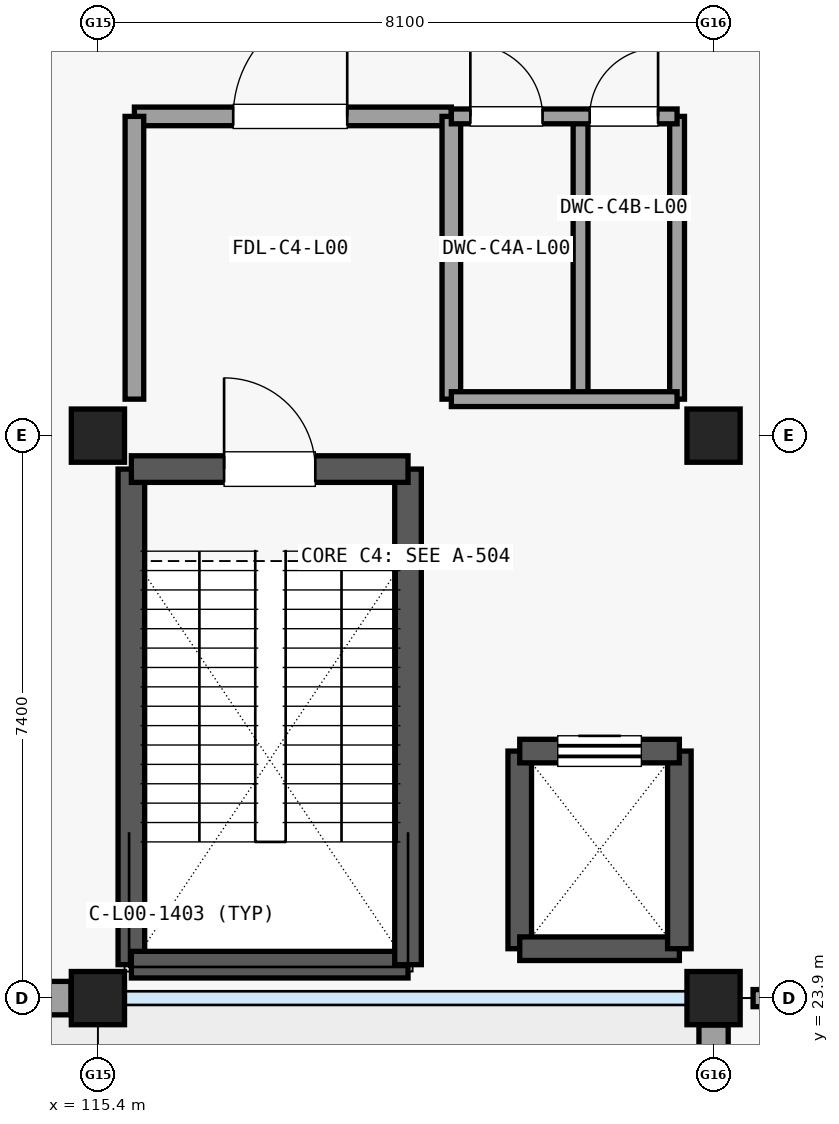
"""IFC4 building model, lengths in metres.
Left out: names, types, materials, properties, quantities, classifications, styles, units other than length and angle.
Written with IfcOpenShell. Run it as: python <this file> out.ifc"""

import sys

from ifc_helpers import new_model, si_unit, direction, frame, frame_2d, origin, origin_2d, place, context, subcontext, project, spatial, rectangle, extrude, element, fill, save


model = new_model("IFC4")
c1 = context("Model", 3, precision=1e-05, world=origin(), true_north=direction((0.0, 1.0)))
c2 = subcontext(c1, "Body", "Model", "MODEL_VIEW")
j1 = project(units=[si_unit("LENGTHUNIT", "METRE"), si_unit("PLANEANGLEUNIT", "RADIAN")], contexts=[c1])
p1 = place(None, origin())
s1 = spatial("IfcSite", under=j1, at=p1, CompositionType="ELEMENT")
p2 = place(p1, origin())
s2 = spatial("IfcBuilding", under=s1, at=p2, CompositionType="ELEMENT")
p3 = place(p2, origin())
s3 = spatial("IfcBuildingStorey", under=s2, at=p3, CompositionType="ELEMENT", Elevation=0.0)
for number, where, z_axis, x_axis in (
    (1, (115.4, 23.9, 0.0), (0.0, 0.0, 1.0), (1.0, 0.0, 0.0)),
    (2, (115.4, 31.3, 0.0), (0.0, 0.0, 1.0), (1.0, 0.0, 0.0)),
    (3, (123.5, 23.9, 0.0), (0.0, 0.0, 1.0), (1.0, 0.0, 0.0)),
    (4, (123.5, 31.3, 0.0), (0.0, 0.0, 1.0), (1.0, 0.0, 0.0)),
):
    element("IfcColumn", number, at=place(p3, frame(where, z_axis=z_axis, x_axis=x_axis)), inside=s3, PredefinedType="COLUMN", context=c2, shape_type="SweptSolid", body=[
        extrude(rectangle(XDim=0.7, YDim=0.7, at=origin_2d()), origin(), (0.0, 0.0, 1.0), 5.135),
    ])
p4 = place(p3, frame((115.046, 23.9, 0.0), z_axis=(0.0, 0.0, 1.0), x_axis=(-1.0, 0.0, 0.0)))
e5 = element("IfcWall", 5, at=p4, inside=s3, PredefinedType="SOLIDWALL", context=c2, shape_type="SweptSolid", body=[
    extrude(rectangle(XDim=7.392, YDim=0.44, at=frame_2d((3.696, 0.0))), origin(), (0.0, 0.0, 1.0), 4.27),
])
p5 = place(p4, frame((2.696, 0.0, 0.0)))
e6 = element("IfcOpeningElement", 6, at=p5, cuts=e5, PredefinedType="OPENING", context=c2, shape_type="SweptSolid", body=[
    extrude(rectangle(XDim=2.0, YDim=2.3, at=frame_2d((1.0, 1.15))), frame((0.0, 0.23, 0.0), z_axis=(0.0, -1.0, 0.0), x_axis=(1.0, 0.0, 0.0)), (0.0, 0.0, 1.0), 0.46),
])
p6 = place(p3, frame((123.5, 16.854, 0.0), z_axis=(0.0, 0.0, 1.0), x_axis=(0.0, 1.0, 0.0)))
e7 = element("IfcWall", 7, at=p6, inside=s3, PredefinedType="SOLIDWALL", context=c2, shape_type="SweptSolid", body=[
    extrude(rectangle(XDim=6.692, YDim=0.385, at=frame_2d((3.346, 0.0))), origin(), (0.0, 0.0, 1.0), 4.27),
])
p7 = place(p6, frame((2.206, 0.0, 0.65)))
e8 = element("IfcOpeningElement", 8, at=p7, cuts=e7, PredefinedType="OPENING", context=c2, shape_type="SweptSolid", body=[
    extrude(rectangle(XDim=0.9, YDim=3.4, at=frame_2d((0.45, 1.7))), frame((0.0, 0.203, 0.0), z_axis=(0.0, -1.0, 0.0), x_axis=(1.0, 0.0, 0.0)), (0.0, 0.0, 1.0), 0.405),
])
p8 = place(p6, frame((3.586, 0.0, 0.65)))
e9 = element("IfcOpeningElement", 9, at=p8, cuts=e7, PredefinedType="OPENING", context=c2, shape_type="SweptSolid", body=[
    extrude(rectangle(XDim=0.9, YDim=3.4, at=frame_2d((0.45, 1.7))), frame((0.0, 0.203, 0.0), z_axis=(0.0, -1.0, 0.0), x_axis=(1.0, 0.0, 0.0)), (0.0, 0.0, 1.0), 0.405),
])
p9 = place(p3, frame((115.84, 24.34, 0.0), z_axis=(0.0, 0.0, 1.0), x_axis=(0.0, 1.0, 0.0)))
e10 = element("IfcWall", 10, at=p9, inside=s3, PredefinedType="SHEAR", context=c2, shape_type="SweptSolid", body=[
    extrude(rectangle(XDim=6.52, YDim=0.35, at=frame_2d((3.26, 0.0))), origin(), (0.0, 0.0, 1.0), 5.13),
])
p10 = place(p3, frame((115.84, 24.34, 0.0), z_axis=(0.0, 0.0, 1.0), x_axis=(1.0, 0.0, 0.0)))
e11 = element("IfcWall", 11, at=p10, inside=s3, PredefinedType="SHEAR", context=c2, shape_type="SweptSolid", body=[
    extrude(rectangle(XDim=3.64, YDim=0.35, at=frame_2d((1.82, 0.0))), origin(), (0.0, 0.0, 1.0), 5.13),
])
p11 = place(p3, frame((119.48, 24.34, 0.0), z_axis=(0.0, 0.0, 1.0), x_axis=(0.0, 1.0, 0.0)))
e12 = element("IfcWall", 12, at=p11, inside=s3, PredefinedType="SHEAR", context=c2, shape_type="SweptSolid", body=[
    extrude(rectangle(XDim=6.52, YDim=0.35, at=frame_2d((3.26, 0.0))), origin(), (0.0, 0.0, 1.0), 5.13),
])
p12 = place(p3, frame((115.84, 30.86, 0.0), z_axis=(0.0, 0.0, 1.0), x_axis=(1.0, 0.0, 0.0)))
e13 = element("IfcWall", 13, at=p12, inside=s3, PredefinedType="SHEAR", context=c2, shape_type="SweptSolid", body=[
    extrude(rectangle(XDim=3.64, YDim=0.35, at=frame_2d((1.82, 0.0))), origin(), (0.0, 0.0, 1.0), 5.13),
])
p13 = place(p12, frame((1.22, 0.0, 0.0)))
e14 = element("IfcOpeningElement", 14, at=p13, cuts=e13, PredefinedType="OPENING", context=c2, shape_type="SweptSolid", body=[
    extrude(rectangle(XDim=1.2, YDim=2.15, at=frame_2d((0.6, 1.075))), frame((0.0, 0.185, 0.0), z_axis=(0.0, -1.0, 0.0), x_axis=(1.0, 0.0, 0.0)), (0.0, 0.0, 1.0), 0.37),
])
p14 = place(p3, frame((120.95, 24.55, 0.0), z_axis=(0.0, 0.0, 1.0), x_axis=(0.0, 1.0, 0.0)))
e15 = element("IfcWall", 15, at=p14, inside=s3, PredefinedType="SHEAR", context=c2, shape_type="SweptSolid", body=[
    extrude(rectangle(XDim=2.6, YDim=0.31, at=frame_2d((1.3, 0.0))), origin(), (0.0, 0.0, 1.0), 5.13),
])
p15 = place(p3, frame((120.95, 24.55, 0.0), z_axis=(0.0, 0.0, 1.0), x_axis=(1.0, 0.0, 0.0)))
e16 = element("IfcWall", 16, at=p15, inside=s3, PredefinedType="SHEAR", context=c2, shape_type="SweptSolid", body=[
    extrude(rectangle(XDim=2.1, YDim=0.31, at=frame_2d((1.05, 0.0))), origin(), (0.0, 0.0, 1.0), 5.13),
])
p16 = place(p3, frame((123.05, 24.55, 0.0), z_axis=(0.0, 0.0, 1.0), x_axis=(0.0, 1.0, 0.0)))
e17 = element("IfcWall", 17, at=p16, inside=s3, PredefinedType="SHEAR", context=c2, shape_type="SweptSolid", body=[
    extrude(rectangle(XDim=2.6, YDim=0.31, at=frame_2d((1.3, 0.0))), origin(), (0.0, 0.0, 1.0), 5.13),
])
p17 = place(p3, frame((120.95, 27.15, 0.0), z_axis=(0.0, 0.0, 1.0), x_axis=(1.0, 0.0, 0.0)))
e18 = element("IfcWall", 18, at=p17, inside=s3, PredefinedType="SHEAR", context=c2, shape_type="SweptSolid", body=[
    extrude(rectangle(XDim=2.1, YDim=0.31, at=frame_2d((1.05, 0.0))), origin(), (0.0, 0.0, 1.0), 5.13),
])
p18 = place(p17, frame((0.5, 0.0, 0.0)))
e19 = element("IfcOpeningElement", 19, at=p18, cuts=e18, PredefinedType="OPENING", context=c2, shape_type="SweptSolid", body=[
    extrude(rectangle(XDim=1.1, YDim=2.15, at=frame_2d((0.55, 1.075))), frame((0.0, 0.165, 0.0), z_axis=(0.0, -1.0, 0.0), x_axis=(1.0, 0.0, 0.0)), (0.0, 0.0, 1.0), 0.33),
])
p19 = place(p3, frame((115.88, 35.5, 0.0), z_axis=(0.0, 0.0, 1.0), x_axis=(1.0, 0.0, 0.0)))
e20 = element("IfcWall", 20, at=p19, inside=s3, PredefinedType="PARTITIONING", context=c2, shape_type="SweptSolid", body=[
    extrude(rectangle(XDim=4.17, YDim=0.245, at=frame_2d((2.085, 0.0))), origin(), (0.0, 0.0, 1.0), 4.325),
])
p20 = place(p19, frame((1.3, 0.0, 0.0)))
e21 = element("IfcOpeningElement", 21, at=p20, cuts=e20, PredefinedType="OPENING", context=c2, shape_type="SweptSolid", body=[
    extrude(rectangle(XDim=1.5, YDim=2.15, at=frame_2d((0.75, 1.075))), frame((0.0, 0.133, 0.0), z_axis=(0.0, -1.0, 0.0), x_axis=(1.0, 0.0, 0.0)), (0.0, 0.0, 1.0), 0.265),
])
for number, where, z_axis, x_axis in (
    (22, (115.88, 31.78, 0.0), (0.0, 0.0, 1.0), (0.0, 1.0, 0.0)),
    (23, (120.05, 31.78, 0.0), (0.0, 0.0, 1.0), (0.0, 1.0, 0.0)),
):
    element("IfcWall", number, at=place(p3, frame(where, z_axis=z_axis, x_axis=x_axis)), inside=s3, PredefinedType="PARTITIONING", context=c2, shape_type="SweptSolid", body=[
        extrude(rectangle(XDim=3.72, YDim=0.245, at=frame_2d((1.86, 0.0))), origin(), (0.0, 0.0, 1.0), 4.275),
    ])
for number, where, z_axis, x_axis in (
    (24, (121.75, 31.78, 0.0), (0.0, 0.0, 1.0), (0.0, 1.0, 0.0)),
    (25, (123.02, 31.78, 0.0), (0.0, 0.0, 1.0), (0.0, 1.0, 0.0)),
):
    element("IfcWall", number, at=place(p3, frame(where, z_axis=z_axis, x_axis=x_axis)), inside=s3, PredefinedType="PARTITIONING", context=c2, shape_type="SweptSolid", body=[
        extrude(rectangle(XDim=3.72, YDim=0.195, at=frame_2d((1.86, 0.0))), origin(), (0.0, 0.0, 1.0), 4.275),
    ])
p21 = place(p3, frame((120.05, 31.78, 0.0), z_axis=(0.0, 0.0, 1.0), x_axis=(1.0, 0.0, 0.0)))
e26 = element("IfcWall", 26, at=p21, inside=s3, PredefinedType="PARTITIONING", context=c2, shape_type="SweptSolid", body=[
    extrude(rectangle(XDim=2.97, YDim=0.195, at=frame_2d((1.485, 0.0))), origin(), (0.0, 0.0, 1.0), 4.275),
])
p22 = place(p3, frame((120.05, 35.5, 0.0), z_axis=(0.0, 0.0, 1.0), x_axis=(1.0, 0.0, 0.0)))
e27 = element("IfcWall", 27, at=p22, inside=s3, PredefinedType="PARTITIONING", context=c2, shape_type="SweptSolid", body=[
    extrude(rectangle(XDim=2.97, YDim=0.195, at=frame_2d((1.485, 0.0))), origin(), (0.0, 0.0, 1.0), 4.325),
])
p23 = place(p22, frame((0.25, 0.0, 0.0)))
e28 = element("IfcOpeningElement", 28, at=p23, cuts=e27, PredefinedType="OPENING", context=c2, shape_type="SweptSolid", body=[
    extrude(rectangle(XDim=0.95, YDim=2.1, at=frame_2d((0.475, 1.05))), frame((0.0, 0.107, 0.0), z_axis=(0.0, -1.0, 0.0), x_axis=(1.0, 0.0, 0.0)), (0.0, 0.0, 1.0), 0.215),
])
p24 = place(p22, frame((1.82, 0.0, 0.0)))
e29 = element("IfcOpeningElement", 29, at=p24, cuts=e27, PredefinedType="OPENING", context=c2, shape_type="SweptSolid", body=[
    extrude(rectangle(XDim=0.9, YDim=2.1, at=frame_2d((0.45, 1.05))), frame((0.0, 0.107, 0.0), z_axis=(0.0, -1.0, 0.0), x_axis=(1.0, 0.0, 0.0)), (0.0, 0.0, 1.0), 0.215),
])
p25 = place(p3, frame((124.02, 23.9, 0.0), z_axis=(0.0, 0.0, 1.0), x_axis=(1.0, 0.0, 0.0)))
e30 = element("IfcWall", 30, at=p25, inside=s3, PredefinedType="PARTITIONING", context=c2, shape_type="SweptSolid", body=[
    extrude(rectangle(XDim=7.06, YDim=0.225, at=frame_2d((3.53, 0.0))), origin(), (0.0, 0.0, 1.0), 4.275),
])
p26 = place(p25, frame((2.63, 0.0, 0.0)))
e31 = element("IfcOpeningElement", 31, at=p26, cuts=e30, PredefinedType="OPENING", context=c2, shape_type="SweptSolid", body=[
    extrude(rectangle(XDim=1.8, YDim=2.4, at=frame_2d((0.9, 1.2))), frame((0.0, 0.123, 0.0), z_axis=(0.0, -1.0, 0.0), x_axis=(1.0, 0.0, 0.0)), (0.0, 0.0, 1.0), 0.245),
])
p27 = place(p13, origin())
e32 = element("IfcDoor", 32, at=p27, inside=s3, OperationType="SINGLE_SWING_LEFT", PredefinedType="DOOR", context=c2, shape_type="SweptSolid", body=[
    extrude(rectangle(XDim=1.2, YDim=2.15, at=frame_2d((0.6, 1.075))), frame((0.0, 0.025, 0.0), z_axis=(0.0, -1.0, 0.0), x_axis=(1.0, 0.0, 0.0)), (0.0, 0.0, 1.0), 0.05),
])
fill(e14, e32)
p28 = place(p18, origin())
e33 = element("IfcDoor", 33, at=p28, inside=s3, OperationType="SLIDING_TO_RIGHT", PredefinedType="DOOR", context=c2, shape_type="SweptSolid", body=[
    extrude(rectangle(XDim=1.1, YDim=2.15, at=frame_2d((0.55, 1.075))), frame((0.0, 0.025, 0.0), z_axis=(0.0, -1.0, 0.0), x_axis=(1.0, 0.0, 0.0)), (0.0, 0.0, 1.0), 0.05),
])
fill(e19, e33)
p29 = place(p20, origin())
e34 = element("IfcDoor", 34, at=p29, inside=s3, OperationType="SINGLE_SWING_RIGHT", PredefinedType="DOOR", context=c2, shape_type="SweptSolid", body=[
    extrude(rectangle(XDim=1.5, YDim=2.15, at=frame_2d((0.75, 1.075))), frame((0.0, 0.025, 0.0), z_axis=(0.0, -1.0, 0.0), x_axis=(1.0, 0.0, 0.0)), (0.0, 0.0, 1.0), 0.05),
])
fill(e21, e34)
p30 = place(p23, origin())
e35 = element("IfcDoor", 35, at=p30, inside=s3, OperationType="SINGLE_SWING_LEFT", PredefinedType="DOOR", context=c2, shape_type="SweptSolid", body=[
    extrude(rectangle(XDim=0.95, YDim=2.1, at=frame_2d((0.475, 1.05))), frame((0.0, 0.025, 0.0), z_axis=(0.0, -1.0, 0.0), x_axis=(1.0, 0.0, 0.0)), (0.0, 0.0, 1.0), 0.05),
])
fill(e28, e35)
p31 = place(p24, origin())
e36 = element("IfcDoor", 36, at=p31, inside=s3, OperationType="SINGLE_SWING_RIGHT", PredefinedType="DOOR", context=c2, shape_type="SweptSolid", body=[
    extrude(rectangle(XDim=0.9, YDim=2.1, at=frame_2d((0.45, 1.05))), frame((0.0, 0.025, 0.0), z_axis=(0.0, -1.0, 0.0), x_axis=(1.0, 0.0, 0.0)), (0.0, 0.0, 1.0), 0.05),
])
fill(e29, e36)
save(model, sys.argv[1])
